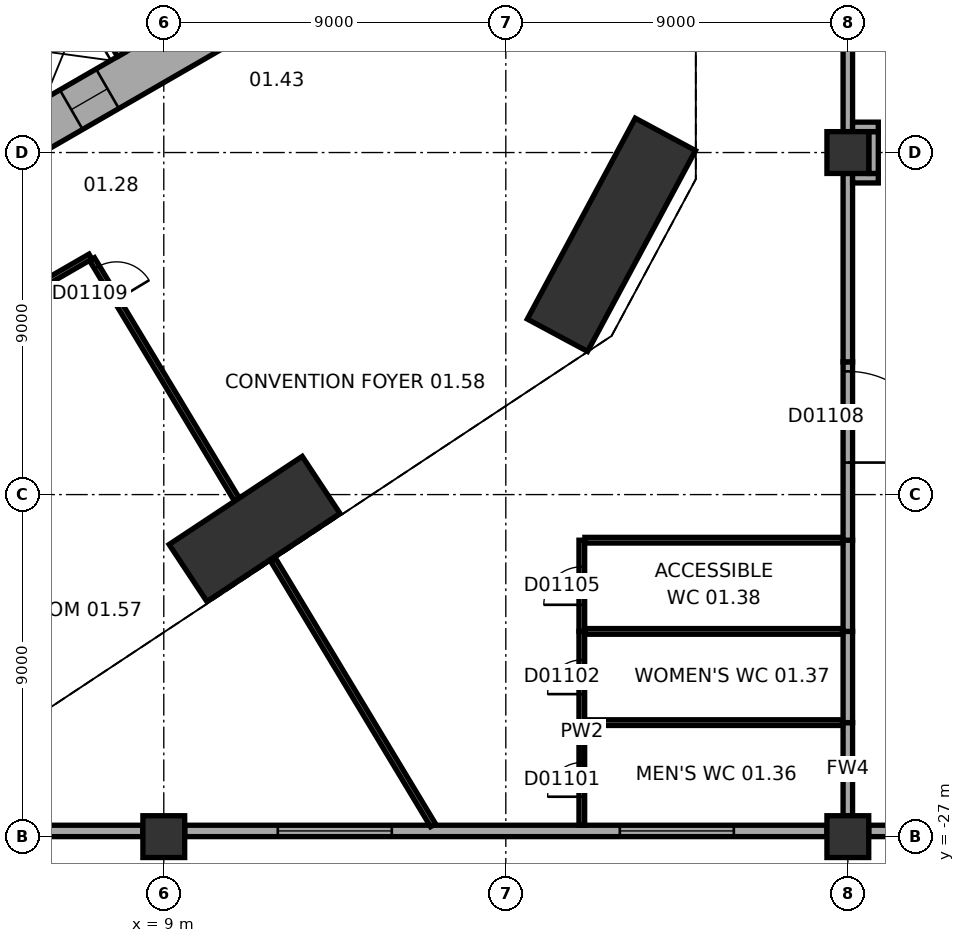
"""IFC4 building model, lengths in metres.
Left out: names, types, materials, properties, quantities, classifications, styles, units other than length and angle.
Written with IfcOpenShell. Run it as: python <this file> out.ifc"""

import sys

from ifc_helpers import new_model, si_unit, direction, frame, frame_2d, origin, origin_2d, place, context, subcontext, project, spatial, rectangle, extrude, element, fill, save


model = new_model("IFC4")
c1 = context("Model", 3, precision=1e-05, world=origin(), true_north=direction((0.0, 1.0)))
c2 = subcontext(c1, "Body", "Model", "MODEL_VIEW")
j1 = project(units=[si_unit("LENGTHUNIT", "METRE"), si_unit("PLANEANGLEUNIT", "RADIAN")], contexts=[c1])
p1 = place(None, origin())
s1 = spatial("IfcSite", under=j1, at=p1, CompositionType="ELEMENT")
p2 = place(p1, origin())
s2 = spatial("IfcBuilding", under=s1, at=p2, CompositionType="ELEMENT")
p3 = place(p2, frame((0.0, 0.0, 7.5)))
s3 = spatial("IfcBuildingStorey", under=s2, at=p3, CompositionType="ELEMENT", Elevation=7.5)
p4 = place(p3, frame((11.389, -18.905, 0.0), z_axis=(0.0, 0.0, 1.0), x_axis=(0.833880042151, 0.551945717714, 0.0)))
e1 = element("IfcColumn", 1, at=p4, inside=s3, PredefinedType="COLUMN", context=c2, shape_type="SweptSolid", body=[
    extrude(rectangle(XDim=4.2, YDim=1.8, at=origin_2d()), origin(), (0.0, 0.0, 1.0), 5.5),
])
p5 = place(p3, frame((20.779, -11.165, 0.0), z_axis=(0.0, 0.0, 1.0), x_axis=(0.473322742071, 0.880889086003, 0.0)))
e2 = element("IfcColumn", 2, at=p5, inside=s3, PredefinedType="COLUMN", context=c2, shape_type="SweptSolid", body=[
    extrude(rectangle(XDim=6.0, YDim=1.8, at=origin_2d()), origin(), (0.0, 0.0, 1.0), 5.5),
])
for number, where, z_axis, x_axis in (
    (3, (9.0, -27.0, 0.0), (0.0, 0.0, 1.0), (1.0, 0.0, 0.0)),
    (4, (27.0, -27.0, 0.0), (0.0, 0.0, 1.0), (1.0, 0.0, 0.0)),
    (5, (27.0, -9.0, 0.0), (0.0, 0.0, 1.0), (1.0, 0.0, 0.0)),
):
    element("IfcColumn", number, at=place(p3, frame(where, z_axis=z_axis, x_axis=x_axis)), inside=s3, PredefinedType="COLUMN", context=c2, shape_type="SweptSolid", body=[
        extrude(rectangle(XDim=1.1, YDim=1.1, at=origin_2d()), origin(), (0.0, 0.0, 1.0), 5.5),
    ])
p6 = place(p3, frame((-0.3, -11.836, 0.0), z_axis=(0.0, 0.0, 1.0), x_axis=(0.866021384402, 0.500006961711, 0.0)))
e6 = element("IfcWall", 6, at=p6, inside=s3, PredefinedType="SHEAR", context=c2, shape_type="SweptSolid", body=[
    extrude(rectangle(XDim=12.355, YDim=1.2, at=frame_2d((6.178, 0.0))), origin(), (0.0, 0.0, 1.0), 5.5),
])
p7 = place(p6, frame((2.828, 0.0, 0.0)))
e7 = element("IfcOpeningElement", 7, at=p7, cuts=e6, PredefinedType="OPENING", context=c2, shape_type="SweptSolid", body=[
    extrude(rectangle(XDim=0.9, YDim=2.1, at=frame_2d((0.45, 1.05))), frame((0.0, 0.61, 0.0), z_axis=(0.0, -1.0, 0.0), x_axis=(1.0, 0.0, 0.0)), (0.0, 0.0, 1.0), 1.22),
])
p8 = place(p6, frame((5.428, 0.0, 0.0)))
e8 = element("IfcOpeningElement", 8, at=p8, cuts=e6, PredefinedType="OPENING", context=c2, shape_type="SweptSolid", body=[
    extrude(rectangle(XDim=0.9, YDim=2.1, at=frame_2d((0.45, 1.05))), frame((0.0, 0.61, 0.0), z_axis=(0.0, -1.0, 0.0), x_axis=(1.0, 0.0, 0.0)), (0.0, 0.0, 1.0), 1.22),
])
p9 = place(p6, frame((7.928, 0.0, 0.0)))
e9 = element("IfcOpeningElement", 9, at=p9, cuts=e6, PredefinedType="OPENING", context=c2, shape_type="SweptSolid", body=[
    extrude(rectangle(XDim=1.1, YDim=2.1, at=frame_2d((0.55, 1.05))), frame((0.0, 0.61, 0.0), z_axis=(0.0, -1.0, 0.0), x_axis=(1.0, 0.0, 0.0)), (0.0, 0.0, 1.0), 1.22),
])
p10 = place(p3, frame((-8.45, -26.85, 0.0), z_axis=(0.0, 0.0, 1.0), x_axis=(1.0, 0.0, 0.0)))
e10 = element("IfcWall", 10, at=p10, inside=s3, PredefinedType="STANDARD", context=c2, shape_type="SweptSolid", body=[
    extrude(rectangle(XDim=16.9, YDim=0.3, at=frame_2d((8.45, 0.0))), origin(), (0.0, 0.0, 1.0), 4.0),
])
p11 = place(p10, frame((2.45, 0.0, 1.0)))
e11 = element("IfcOpeningElement", 11, at=p11, cuts=e10, PredefinedType="OPENING", context=c2, shape_type="SweptSolid", body=[
    extrude(rectangle(XDim=3.0, YDim=2.6, at=frame_2d((1.5, 1.3))), frame((0.0, 0.16, 0.0), z_axis=(0.0, -1.0, 0.0), x_axis=(1.0, 0.0, 0.0)), (0.0, 0.0, 1.0), 0.32),
])
p12 = place(p10, frame((11.45, 0.0, 1.0)))
e12 = element("IfcOpeningElement", 12, at=p12, cuts=e10, PredefinedType="OPENING", context=c2, shape_type="SweptSolid", body=[
    extrude(rectangle(XDim=3.0, YDim=2.6, at=frame_2d((1.5, 1.3))), frame((0.0, 0.16, 0.0), z_axis=(0.0, -1.0, 0.0), x_axis=(1.0, 0.0, 0.0)), (0.0, 0.0, 1.0), 0.32),
])
p13 = place(p3, frame((9.55, -26.85, 0.0), z_axis=(0.0, 0.0, 1.0), x_axis=(1.0, 0.0, 0.0)))
e13 = element("IfcWall", 13, at=p13, inside=s3, PredefinedType="STANDARD", context=c2, shape_type="SweptSolid", body=[
    extrude(rectangle(XDim=16.9, YDim=0.3, at=frame_2d((8.45, 0.0))), origin(), (0.0, 0.0, 1.0), 4.0),
])
p14 = place(p13, frame((2.45, 0.0, 1.0)))
e14 = element("IfcOpeningElement", 14, at=p14, cuts=e13, PredefinedType="OPENING", context=c2, shape_type="SweptSolid", body=[
    extrude(rectangle(XDim=3.0, YDim=2.6, at=frame_2d((1.5, 1.3))), frame((0.0, 0.16, 0.0), z_axis=(0.0, -1.0, 0.0), x_axis=(1.0, 0.0, 0.0)), (0.0, 0.0, 1.0), 0.32),
])
p15 = place(p13, frame((11.45, 0.0, 1.0)))
e15 = element("IfcOpeningElement", 15, at=p15, cuts=e13, PredefinedType="OPENING", context=c2, shape_type="SweptSolid", body=[
    extrude(rectangle(XDim=3.0, YDim=2.6, at=frame_2d((1.5, 1.3))), frame((0.0, 0.16, 0.0), z_axis=(0.0, -1.0, 0.0), x_axis=(1.0, 0.0, 0.0)), (0.0, 0.0, 1.0), 0.32),
])
p16 = place(p3, frame((27.55, -26.85, 0.0), z_axis=(0.0, 0.0, 1.0), x_axis=(1.0, 0.0, 0.0)))
e16 = element("IfcWall", 16, at=p16, inside=s3, PredefinedType="STANDARD", context=c2, shape_type="SweptSolid", body=[
    extrude(rectangle(XDim=16.9, YDim=0.3, at=frame_2d((8.45, 0.0))), origin(), (0.0, 0.0, 1.0), 4.0),
])
p17 = place(p16, frame((2.45, 0.0, 1.0)))
e17 = element("IfcOpeningElement", 17, at=p17, cuts=e16, PredefinedType="OPENING", context=c2, shape_type="SweptSolid", body=[
    extrude(rectangle(XDim=3.0, YDim=2.6, at=frame_2d((1.5, 1.3))), frame((0.0, 0.16, 0.0), z_axis=(0.0, -1.0, 0.0), x_axis=(1.0, 0.0, 0.0)), (0.0, 0.0, 1.0), 0.32),
])
p18 = place(p16, frame((11.45, 0.0, 1.0)))
e18 = element("IfcOpeningElement", 18, at=p18, cuts=e16, PredefinedType="OPENING", context=c2, shape_type="SweptSolid", body=[
    extrude(rectangle(XDim=3.0, YDim=2.6, at=frame_2d((1.5, 1.3))), frame((0.0, 0.16, 0.0), z_axis=(0.0, -1.0, 0.0), x_axis=(1.0, 0.0, 0.0)), (0.0, 0.0, 1.0), 0.32),
])
p19 = place(p3, frame((-0.024, -8.559, 0.0), z_axis=(0.0, 0.0, 1.0), x_axis=(0.866026010844, 0.49999894854, 0.0)))
e19 = element("IfcWall", 19, at=p19, inside=s3, PredefinedType="PARTITIONING", context=c2, shape_type="SweptSolid", body=[
    extrude(rectangle(XDim=8.0, YDim=0.2, at=frame_2d((4.0, 0.0))), origin(), (0.0, 0.0, 1.0), 5.2),
])
p20 = place(p3, frame((6.768, -4.522, 0.0), z_axis=(0.0, 0.0, 1.0), x_axis=(0.50002983664, -0.866008176907, 0.0)))
e20 = element("IfcWall", 20, at=p20, inside=s3, PredefinedType="PARTITIONING", context=c2, shape_type="SweptSolid", body=[
    extrude(rectangle(XDim=2.2, YDim=0.2, at=frame_2d((1.1, 0.0))), origin(), (0.0, 0.0, 1.0), 5.2),
])
p21 = place(p3, frame((0.847, -7.767, 0.0), z_axis=(0.0, 0.0, 1.0), x_axis=(0.866027801685, 0.499995846692, 0.0)))
e21 = element("IfcWall", 21, at=p21, inside=s3, PredefinedType="SHEAR", context=c2, shape_type="SweptSolid", body=[
    extrude(rectangle(XDim=7.06, YDim=0.3, at=frame_2d((3.53, 0.0))), origin(), (0.0, 0.0, 1.0), 5.2),
])
p22 = place(p3, frame((20.0, -26.7, 0.0), z_axis=(0.0, 0.0, 1.0), x_axis=(0.0, 1.0, 0.0)))
e22 = element("IfcWall", 22, at=p22, inside=s3, PredefinedType="PARTITIONING", context=c2, shape_type="SweptSolid", body=[
    extrude(rectangle(XDim=2.7, YDim=0.15, at=frame_2d((1.35, 0.0))), origin(), (0.0, 0.0, 1.0), 5.2),
])
p23 = place(p22, frame((0.75, 0.0, 0.0)))
e23 = element("IfcOpeningElement", 23, at=p23, cuts=e22, PredefinedType="OPENING", context=c2, shape_type="SweptSolid", body=[
    extrude(rectangle(XDim=0.9, YDim=2.1, at=frame_2d((0.45, 1.05))), frame((0.0, 0.085, 0.0), z_axis=(0.0, -1.0, 0.0), x_axis=(1.0, 0.0, 0.0)), (0.0, 0.0, 1.0), 0.17),
])
p24 = place(p3, frame((27.0, -26.45, 0.0), z_axis=(0.0, 0.0, 1.0), x_axis=(0.0, 1.0, 0.0)))
e24 = element("IfcWall", 24, at=p24, inside=s3, PredefinedType="SOLIDWALL", context=c2, shape_type="SweptSolid", body=[
    extrude(rectangle(XDim=2.45, YDim=0.25, at=frame_2d((1.225, 0.0))), origin(), (0.0, 0.0, 1.0), 4.0),
])
p25 = place(p3, frame((20.0, -24.0, 0.0), z_axis=(0.0, 0.0, 1.0), x_axis=(0.0, 1.0, 0.0)))
e25 = element("IfcWall", 25, at=p25, inside=s3, PredefinedType="PARTITIONING", context=c2, shape_type="SweptSolid", body=[
    extrude(rectangle(XDim=2.4, YDim=0.15, at=frame_2d((1.2, 0.0))), origin(), (0.0, 0.0, 1.0), 5.2),
])
p26 = place(p25, frame((0.75, 0.0, 0.0)))
e26 = element("IfcOpeningElement", 26, at=p26, cuts=e25, PredefinedType="OPENING", context=c2, shape_type="SweptSolid", body=[
    extrude(rectangle(XDim=0.9, YDim=2.1, at=frame_2d((0.45, 1.05))), frame((0.0, 0.085, 0.0), z_axis=(0.0, -1.0, 0.0), x_axis=(1.0, 0.0, 0.0)), (0.0, 0.0, 1.0), 0.17),
])
p27 = place(p3, frame((20.08, -24.0, 0.0), z_axis=(0.0, 0.0, 1.0), x_axis=(1.0, 0.0, 0.0)))
e27 = element("IfcWall", 27, at=p27, inside=s3, PredefinedType="PARTITIONING", context=c2, shape_type="SweptSolid", body=[
    extrude(rectangle(XDim=6.78, YDim=0.15, at=frame_2d((3.39, 0.0))), origin(), (0.0, 0.0, 1.0), 5.2),
])
p28 = place(p3, frame((27.0, -24.0, 0.0), z_axis=(0.0, 0.0, 1.0), x_axis=(0.0, 1.0, 0.0)))
e28 = element("IfcWall", 28, at=p28, inside=s3, PredefinedType="SOLIDWALL", context=c2, shape_type="SweptSolid", body=[
    extrude(rectangle(XDim=2.4, YDim=0.25, at=frame_2d((1.2, 0.0))), origin(), (0.0, 0.0, 1.0), 4.0),
])
p29 = place(p3, frame((20.0, -21.6, 0.0), z_axis=(0.0, 0.0, 1.0), x_axis=(0.0, 1.0, 0.0)))
e29 = element("IfcWall", 29, at=p29, inside=s3, PredefinedType="PARTITIONING", context=c2, shape_type="SweptSolid", body=[
    extrude(rectangle(XDim=2.4, YDim=0.15, at=frame_2d((1.2, 0.0))), origin(), (0.0, 0.0, 1.0), 5.2),
])
p30 = place(p29, frame((0.7, 0.0, 0.0)))
e30 = element("IfcOpeningElement", 30, at=p30, cuts=e29, PredefinedType="OPENING", context=c2, shape_type="SweptSolid", body=[
    extrude(rectangle(XDim=1.0, YDim=2.1, at=frame_2d((0.5, 1.05))), frame((0.0, 0.085, 0.0), z_axis=(0.0, -1.0, 0.0), x_axis=(1.0, 0.0, 0.0)), (0.0, 0.0, 1.0), 0.17),
])
p31 = place(p3, frame((20.08, -21.6, 0.0), z_axis=(0.0, 0.0, 1.0), x_axis=(1.0, 0.0, 0.0)))
e31 = element("IfcWall", 31, at=p31, inside=s3, PredefinedType="PARTITIONING", context=c2, shape_type="SweptSolid", body=[
    extrude(rectangle(XDim=6.78, YDim=0.15, at=frame_2d((3.39, 0.0))), origin(), (0.0, 0.0, 1.0), 5.2),
])
p32 = place(p3, frame((27.0, -21.6, 0.0), z_axis=(0.0, 0.0, 1.0), x_axis=(0.0, 1.0, 0.0)))
e32 = element("IfcWall", 32, at=p32, inside=s3, PredefinedType="SOLIDWALL", context=c2, shape_type="SweptSolid", body=[
    extrude(rectangle(XDim=2.4, YDim=0.25, at=frame_2d((1.2, 0.0))), origin(), (0.0, 0.0, 1.0), 4.0),
])
p33 = place(p3, frame((11.879, -19.719, 0.0), z_axis=(0.0, 0.0, 1.0), x_axis=(0.516054476578, -0.856555764212, 0.0)))
e33 = element("IfcWall", 33, at=p33, inside=s3, PredefinedType="PARTITIONING", context=c2, shape_type="SweptSolid", body=[
    extrude(rectangle(XDim=8.149, YDim=0.15, at=frame_2d((4.075, 0.0))), origin(), (0.0, 0.0, 1.0), 5.2),
])
p34 = place(p3, frame((20.08, -19.2, 0.0), z_axis=(0.0, 0.0, 1.0), x_axis=(1.0, 0.0, 0.0)))
e34 = element("IfcWall", 34, at=p34, inside=s3, PredefinedType="PARTITIONING", context=c2, shape_type="SweptSolid", body=[
    extrude(rectangle(XDim=6.78, YDim=0.15, at=frame_2d((3.39, 0.0))), origin(), (0.0, 0.0, 1.0), 5.2),
])
p35 = place(p3, frame((27.0, -19.2, 0.0), z_axis=(0.0, 0.0, 1.0), x_axis=(0.0, 1.0, 0.0)))
e35 = element("IfcWall", 35, at=p35, inside=s3, PredefinedType="SOLIDWALL", context=c2, shape_type="SweptSolid", body=[
    extrude(rectangle(XDim=4.692, YDim=0.25, at=frame_2d((2.346, 0.0))), origin(), (0.0, 0.0, 1.0), 4.0),
])
p36 = place(p35, frame((2.042, 0.0, 0.0)))
e36 = element("IfcOpeningElement", 36, at=p36, cuts=e35, PredefinedType="OPENING", context=c2, shape_type="SweptSolid", body=[
    extrude(rectangle(XDim=2.4, YDim=2.4, at=frame_2d((1.2, 1.2))), frame((0.0, 0.135, 0.0), z_axis=(0.0, -1.0, 0.0), x_axis=(1.0, 0.0, 0.0)), (0.0, 0.0, 1.0), 0.27),
])
p37 = place(p3, frame((10.924, -18.133, 0.0), z_axis=(0.0, 0.0, 1.0), x_axis=(-0.516035715917, 0.856567066784, 0.0)))
e37 = element("IfcWall", 37, at=p37, inside=s3, PredefinedType="PARTITIONING", context=c2, shape_type="SweptSolid", body=[
    extrude(rectangle(XDim=7.387, YDim=0.15, at=frame_2d((3.693, 0.0))), origin(), (0.0, 0.0, 1.0), 5.2),
])
p38 = place(p37, frame((6.137, 0.0, 0.0)))
e38 = element("IfcOpeningElement", 38, at=p38, cuts=e37, PredefinedType="OPENING", context=c2, shape_type="SweptSolid", body=[
    extrude(rectangle(XDim=1.0, YDim=2.1, at=frame_2d((0.5, 1.05))), frame((0.0, 0.085, 0.0), z_axis=(0.0, -1.0, 0.0), x_axis=(1.0, 0.0, 0.0)), (0.0, 0.0, 1.0), 0.17),
])
p39 = place(p3, frame((0.475, -15.545, 0.0), z_axis=(0.0, 0.0, 1.0), x_axis=(0.866021168401, 0.500007335828, 0.0)))
e39 = element("IfcWall", 39, at=p39, inside=s3, PredefinedType="PARTITIONING", context=c2, shape_type="SweptSolid", body=[
    extrude(rectangle(XDim=7.616, YDim=0.15, at=frame_2d((3.808, 0.0))), origin(), (0.0, 0.0, 1.0), 5.2),
])
p40 = place(p3, frame((27.0, -14.508, 0.0), z_axis=(0.0, 0.0, 1.0), x_axis=(0.0, 1.0, 0.0)))
e40 = element("IfcWall", 40, at=p40, inside=s3, PredefinedType="SOLIDWALL", context=c2, shape_type="SweptSolid", body=[
    extrude(rectangle(XDim=4.958, YDim=0.25, at=frame_2d((2.479, 0.0))), origin(), (0.0, 0.0, 1.0), 4.0),
])
p41 = place(p3, frame((27.125, -9.675, 0.0), z_axis=(0.0, 0.0, 1.0), x_axis=(1.0, 0.0, 0.0)))
e41 = element("IfcWall", 41, at=p41, inside=s3, PredefinedType="SOLIDWALL", context=c2, shape_type="SweptSolid", body=[
    extrude(rectangle(XDim=0.677, YDim=0.25, at=frame_2d((0.338, 0.0))), origin(), (0.0, 0.0, 1.0), 5.2),
])
p42 = place(p3, frame((27.677, -9.55, 0.0), z_axis=(0.0, 0.0, 1.0), x_axis=(0.0, 1.0, 0.0)))
e42 = element("IfcWall", 42, at=p42, inside=s3, PredefinedType="SOLIDWALL", context=c2, shape_type="SweptSolid", body=[
    extrude(rectangle(XDim=1.1, YDim=0.25, at=frame_2d((0.55, 0.0))), origin(), (0.0, 0.0, 1.0), 5.2),
])
p43 = place(p3, frame((27.0, -8.45, 0.0), z_axis=(0.0, 0.0, 1.0), x_axis=(0.0, 1.0, 0.0)))
e43 = element("IfcWall", 43, at=p43, inside=s3, PredefinedType="SOLIDWALL", context=c2, shape_type="SweptSolid", body=[
    extrude(rectangle(XDim=9.597, YDim=0.25, at=frame_2d((4.799, 0.0))), origin(), (0.0, 0.0, 1.0), 4.0),
])
p44 = place(p43, frame((6.597, 0.0, 0.0)))
e44 = element("IfcOpeningElement", 44, at=p44, cuts=e43, PredefinedType="OPENING", context=c2, shape_type="SweptSolid", body=[
    extrude(rectangle(XDim=2.4, YDim=2.4, at=frame_2d((1.2, 1.2))), frame((0.0, 0.135, 0.0), z_axis=(0.0, -1.0, 0.0), x_axis=(1.0, 0.0, 0.0)), (0.0, 0.0, 1.0), 0.27),
])
p45 = place(p3, frame((27.125, -8.325, 0.0), z_axis=(0.0, 0.0, 1.0), x_axis=(1.0, 0.0, 0.0)))
e45 = element("IfcWall", 45, at=p45, inside=s3, PredefinedType="SOLIDWALL", context=c2, shape_type="SweptSolid", body=[
    extrude(rectangle(XDim=0.677, YDim=0.25, at=frame_2d((0.338, 0.0))), origin(), (0.0, 0.0, 1.0), 5.2),
])
p46 = place(p14, origin())
e46 = element("IfcWindow", 46, at=p46, inside=s3, PartitioningType="SINGLE_PANEL", PredefinedType="WINDOW", context=c2, shape_type="SweptSolid", body=[
    extrude(rectangle(XDim=3.0, YDim=2.6, at=frame_2d((1.5, 1.3))), frame((0.0, 0.03, 0.0), z_axis=(0.0, -1.0, 0.0), x_axis=(1.0, 0.0, 0.0)), (0.0, 0.0, 1.0), 0.06),
])
fill(e14, e46)
p47 = place(p15, origin())
e47 = element("IfcWindow", 47, at=p47, inside=s3, PartitioningType="SINGLE_PANEL", PredefinedType="WINDOW", context=c2, shape_type="SweptSolid", body=[
    extrude(rectangle(XDim=3.0, YDim=2.6, at=frame_2d((1.5, 1.3))), frame((0.0, 0.03, 0.0), z_axis=(0.0, -1.0, 0.0), x_axis=(1.0, 0.0, 0.0)), (0.0, 0.0, 1.0), 0.06),
])
fill(e15, e47)
p48 = place(p9, origin())
e48 = element("IfcDoor", 48, at=p48, inside=s3, OperationType="DOUBLE_DOOR_SLIDING", PredefinedType="DOOR", context=c2, shape_type="SweptSolid", body=[
    extrude(rectangle(XDim=1.1, YDim=2.1, at=frame_2d((0.55, 1.05))), frame((0.0, 0.025, 0.0), z_axis=(0.0, -1.0, 0.0), x_axis=(1.0, 0.0, 0.0)), (0.0, 0.0, 1.0), 0.05),
])
fill(e9, e48)
p49 = place(p23, origin())
e49 = element("IfcDoor", 49, at=p49, inside=s3, OperationType="SINGLE_SWING_LEFT", PredefinedType="DOOR", context=c2, shape_type="SweptSolid", body=[
    extrude(rectangle(XDim=0.9, YDim=2.1, at=frame_2d((0.45, 1.05))), frame((0.0, 0.025, 0.0), z_axis=(0.0, -1.0, 0.0), x_axis=(1.0, 0.0, 0.0)), (0.0, 0.0, 1.0), 0.05),
])
fill(e23, e49)
p50 = place(p26, origin())
e50 = element("IfcDoor", 50, at=p50, inside=s3, OperationType="SINGLE_SWING_LEFT", PredefinedType="DOOR", context=c2, shape_type="SweptSolid", body=[
    extrude(rectangle(XDim=0.9, YDim=2.1, at=frame_2d((0.45, 1.05))), frame((0.0, 0.025, 0.0), z_axis=(0.0, -1.0, 0.0), x_axis=(1.0, 0.0, 0.0)), (0.0, 0.0, 1.0), 0.05),
])
fill(e26, e50)
p51 = place(p30, origin())
e51 = element("IfcDoor", 51, at=p51, inside=s3, OperationType="SINGLE_SWING_LEFT", PredefinedType="DOOR", context=c2, shape_type="SweptSolid", body=[
    extrude(rectangle(XDim=1.0, YDim=2.1, at=frame_2d((0.5, 1.05))), frame((0.0, 0.025, 0.0), z_axis=(0.0, -1.0, 0.0), x_axis=(1.0, 0.0, 0.0)), (0.0, 0.0, 1.0), 0.05),
])
fill(e30, e51)
p52 = place(p36, origin())
e52 = element("IfcDoor", 52, at=p52, inside=s3, OperationType="DOUBLE_DOOR_SINGLE_SWING", PredefinedType="DOOR", context=c2, shape_type="SweptSolid", body=[
    extrude(rectangle(XDim=2.4, YDim=2.4, at=frame_2d((1.2, 1.2))), frame((0.0, 0.025, 0.0), z_axis=(0.0, -1.0, 0.0), x_axis=(1.0, 0.0, 0.0)), (0.0, 0.0, 1.0), 0.05),
])
fill(e36, e52)
p53 = place(p38, origin())
e53 = element("IfcDoor", 53, at=p53, inside=s3, OperationType="SINGLE_SWING_LEFT", PredefinedType="DOOR", context=c2, shape_type="SweptSolid", body=[
    extrude(rectangle(XDim=1.0, YDim=2.1, at=frame_2d((0.5, 1.05))), frame((0.0, 0.025, 0.0), z_axis=(0.0, -1.0, 0.0), x_axis=(1.0, 0.0, 0.0)), (0.0, 0.0, 1.0), 0.05),
])
fill(e38, e53)
save(model, sys.argv[1])
